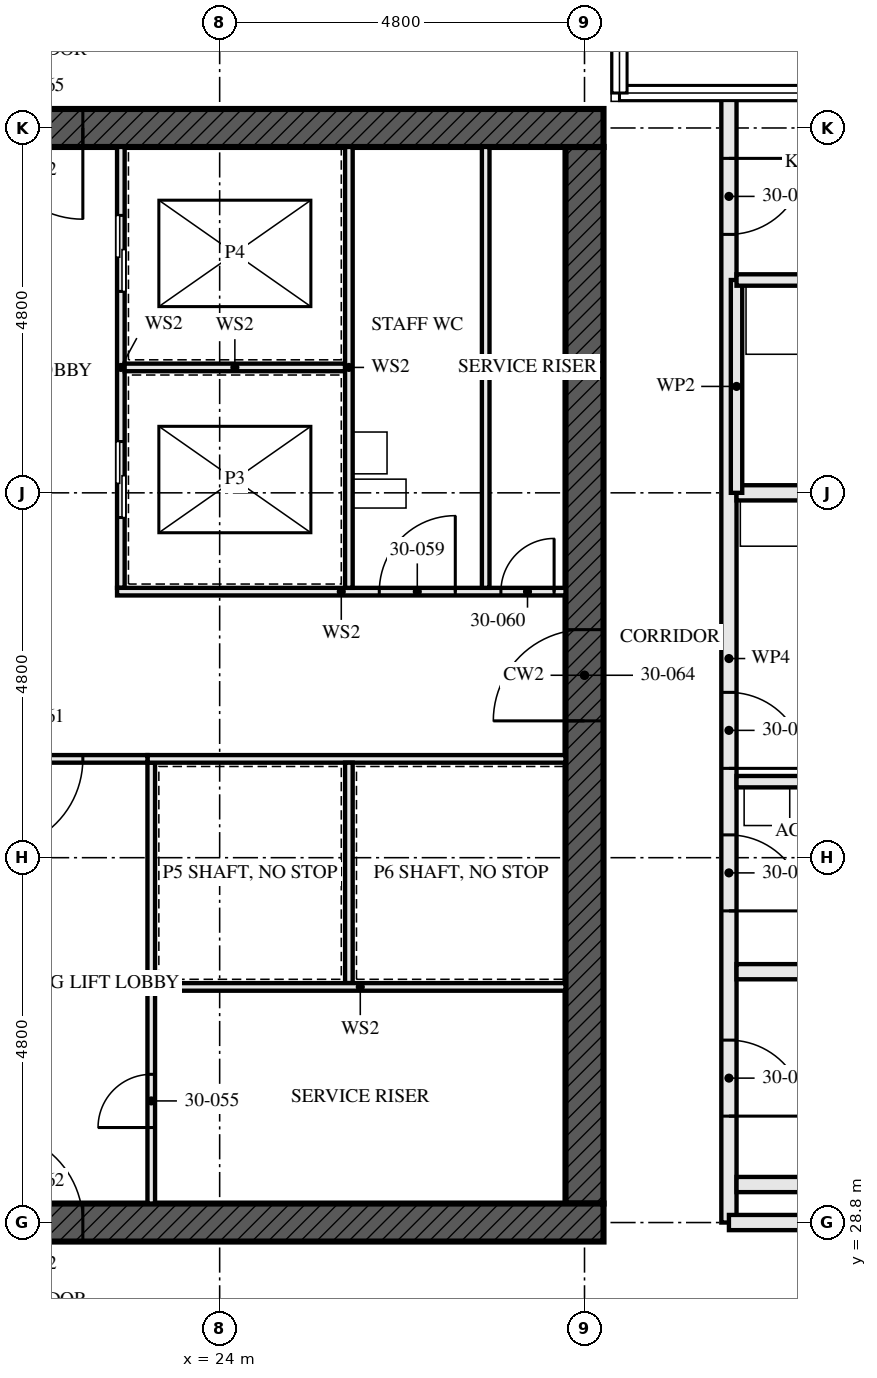
"""IFC4 building model, lengths in metres.
Left out: names, types, materials, properties, quantities, classifications, styles, units other than length and angle.
Written with IfcOpenShell. Run it as: python <this file> out.ifc"""

import sys

from ifc_helpers import new_model, si_unit, direction, frame, frame_2d, origin, place, context, subcontext, project, spatial, rectangle, extrude, element, fill, save


model = new_model("IFC4")
c1 = context("Model", 3, precision=1e-05, world=origin(), true_north=direction((0.0, 1.0)))
c2 = subcontext(c1, "Body", "Model", "MODEL_VIEW")
j1 = project(units=[si_unit("LENGTHUNIT", "METRE"), si_unit("PLANEANGLEUNIT", "RADIAN")], contexts=[c1])
p1 = place(None, origin())
s1 = spatial("IfcSite", under=j1, at=p1, CompositionType="ELEMENT")
p2 = place(p1, origin())
s2 = spatial("IfcBuilding", under=s1, at=p2, CompositionType="ELEMENT")
p3 = place(p2, frame((0.0, 0.0, 112.0)))
s3 = spatial("IfcBuildingStorey", under=s2, at=p3, CompositionType="ELEMENT", Elevation=112.0)
p4 = place(p3, frame((14.15, 28.8, -0.17), z_axis=(0.0, 0.0, 1.0), x_axis=(1.0, 0.0, 0.0)))
e1 = element("IfcWall", 1, at=p4, inside=s3, PredefinedType="SHEAR", context=c2, shape_type="SweptSolid", body=[
    extrude(rectangle(XDim=14.9, YDim=0.5, at=frame_2d((7.45, 0.0))), origin(), (0.0, 0.0, 1.0), 3.5),
])
p5 = place(p4, frame((6.85, 0.0, 0.17)))
e2 = element("IfcOpeningElement", 2, at=p5, cuts=e1, PredefinedType="OPENING", context=c2, shape_type="SweptSolid", body=[
    extrude(rectangle(XDim=1.2, YDim=2.1, at=frame_2d((0.6, 1.05))), frame((0.0, 0.26, 0.0), z_axis=(0.0, -1.0, 0.0), x_axis=(1.0, 0.0, 0.0)), (0.0, 0.0, 1.0), 0.521),
])
p6 = place(p3, frame((29.05, 43.2, -0.17), z_axis=(0.0, 0.0, 1.0), x_axis=(-1.0, 0.0, 0.0)))
e3 = element("IfcWall", 3, at=p6, inside=s3, PredefinedType="SHEAR", context=c2, shape_type="SweptSolid", body=[
    extrude(rectangle(XDim=14.9, YDim=0.5, at=frame_2d((7.45, 0.0))), origin(), (0.0, 0.0, 1.0), 3.5),
])
p7 = place(p6, frame((6.85, 0.0, 0.17)))
e4 = element("IfcOpeningElement", 4, at=p7, cuts=e3, PredefinedType="OPENING", context=c2, shape_type="SweptSolid", body=[
    extrude(rectangle(XDim=1.2, YDim=2.1, at=frame_2d((0.6, 1.05))), frame((0.0, 0.26, 0.0), z_axis=(0.0, -1.0, 0.0), x_axis=(1.0, 0.0, 0.0)), (0.0, 0.0, 1.0), 0.521),
])
p8 = place(p3, frame((28.8, 29.05, -0.17), z_axis=(0.0, 0.0, 1.0), x_axis=(0.0, 1.0, 0.0)))
e5 = element("IfcWall", 5, at=p8, inside=s3, PredefinedType="SHEAR", context=c2, shape_type="SweptSolid", body=[
    extrude(rectangle(XDim=13.9, YDim=0.5, at=frame_2d((6.95, 0.0))), origin(), (0.0, 0.0, 1.0), 3.5),
])
p9 = place(p8, frame((6.35, 0.0, 0.17)))
e6 = element("IfcOpeningElement", 6, at=p9, cuts=e5, PredefinedType="OPENING", context=c2, shape_type="SweptSolid", body=[
    extrude(rectangle(XDim=1.2, YDim=2.1, at=frame_2d((0.6, 1.05))), frame((0.0, 0.26, 0.0), z_axis=(0.0, -1.0, 0.0), x_axis=(1.0, 0.0, 0.0)), (0.0, 0.0, 1.0), 0.521),
])
for number, where, z_axis, x_axis in (
    (7, (35.5, 29.3, 0.0), (0.0, 0.0, 1.0), (-1.0, 0.0, 0.0)),
    (8, (35.5, 32.1, 0.0), (0.0, 0.0, 1.0), (-1.0, 0.0, 0.0)),
):
    element("IfcWall", number, at=place(p3, frame(where, z_axis=z_axis, x_axis=x_axis)), inside=s3, PredefinedType="SOLIDWALL", context=c2, shape_type="SweptSolid", body=[
        extrude(rectangle(XDim=4.7, YDim=0.2, at=frame_2d((2.35, 0.0))), origin(), (0.0, 0.0, 1.0), 2.99),
    ])
p10 = place(p3, frame((33.8, 34.6, 0.0), z_axis=(0.0, 0.0, 1.0), x_axis=(-1.0, 0.0, 0.0)))
e9 = element("IfcWall", 9, at=p10, inside=s3, PredefinedType="PARTITIONING", context=c2, shape_type="SweptSolid", body=[
    extrude(rectangle(XDim=3.0, YDim=0.15, at=frame_2d((1.5, 0.0))), origin(), (0.0, 0.0, 1.0), 3.33),
])
p11 = place(p3, frame((38.08, 38.4, 0.0), z_axis=(0.0, 0.0, 1.0), x_axis=(-1.0, 0.0, 0.0)))
e10 = element("IfcWall", 10, at=p11, inside=s3, PredefinedType="PARTITIONING", context=c2, shape_type="SweptSolid", body=[
    extrude(rectangle(XDim=7.28, YDim=0.2, at=frame_2d((3.64, 0.0))), origin(), (0.0, 0.0, 1.0), 2.55),
])
p12 = place(p3, frame((33.8, 41.2, 0.0), z_axis=(0.0, 0.0, 1.0), x_axis=(-1.0, 0.0, 0.0)))
e11 = element("IfcWall", 11, at=p12, inside=s3, PredefinedType="PARTITIONING", context=c2, shape_type="SweptSolid", body=[
    extrude(rectangle(XDim=3.0, YDim=0.15, at=frame_2d((1.5, 0.0))), origin(), (0.0, 0.0, 1.0), 3.33),
])
p13 = place(p3, frame((30.8, 38.4, 0.0), z_axis=(0.0, 0.0, 1.0), x_axis=(0.0, 1.0, 0.0)))
e12 = element("IfcWall", 12, at=p13, inside=s3, PredefinedType="PARTITIONING", context=c2, shape_type="SweptSolid", body=[
    extrude(rectangle(XDim=2.8, YDim=0.15, at=frame_2d((1.4, 0.0))), origin(), (0.0, 0.0, 1.0), 3.33),
])
p14 = place(p3, frame((30.7, 28.8, 0.0), z_axis=(0.0, 0.0, 1.0), x_axis=(0.0, 1.0, 0.0)))
e13 = element("IfcWall", 13, at=p14, inside=s3, PredefinedType="PARTITIONING", context=c2, shape_type="SweptSolid", body=[
    extrude(rectangle(XDim=14.84, YDim=0.2, at=frame_2d((7.42, 0.0))), origin(), (0.0, 0.0, 1.0), 2.32),
])
p15 = place(p14, frame((1.4, 0.0, 0.0)))
e14 = element("IfcOpeningElement", 14, at=p15, cuts=e13, PredefinedType="OPENING", context=c2, shape_type="SweptSolid", body=[
    extrude(rectangle(XDim=1.0, YDim=2.1, at=frame_2d((0.5, 1.05))), frame((0.0, 0.111, 0.0), z_axis=(0.0, -1.0, 0.0), x_axis=(1.0, 0.0, 0.0)), (0.0, 0.0, 1.0), 0.221),
])
p16 = place(p14, frame((4.1, 0.0, 0.0)))
e15 = element("IfcOpeningElement", 15, at=p16, cuts=e13, PredefinedType="OPENING", context=c2, shape_type="SweptSolid", body=[
    extrude(rectangle(XDim=1.0, YDim=2.1, at=frame_2d((0.5, 1.05))), frame((0.0, 0.111, 0.0), z_axis=(0.0, -1.0, 0.0), x_axis=(1.0, 0.0, 0.0)), (0.0, 0.0, 1.0), 0.221),
])
p17 = place(p14, frame((5.975, 0.0, 0.0)))
e16 = element("IfcOpeningElement", 16, at=p17, cuts=e13, PredefinedType="OPENING", context=c2, shape_type="SweptSolid", body=[
    extrude(rectangle(XDim=1.0, YDim=2.1, at=frame_2d((0.5, 1.05))), frame((0.0, 0.111, 0.0), z_axis=(0.0, -1.0, 0.0), x_axis=(1.0, 0.0, 0.0)), (0.0, 0.0, 1.0), 0.221),
])
p18 = place(p14, frame((13.0, 0.0, 0.0)))
e17 = element("IfcOpeningElement", 17, at=p18, cuts=e13, PredefinedType="OPENING", context=c2, shape_type="SweptSolid", body=[
    extrude(rectangle(XDim=1.0, YDim=2.1, at=frame_2d((0.5, 1.05))), frame((0.0, 0.111, 0.0), z_axis=(0.0, -1.0, 0.0), x_axis=(1.0, 0.0, 0.0)), (0.0, 0.0, 1.0), 0.221),
])
p19 = place(p3, frame((27.5, 37.15, 0.0), z_axis=(0.0, 0.0, 1.0), x_axis=(0.0, 1.0, 0.0)))
e18 = element("IfcWall", 18, at=p19, inside=s3, PredefinedType="SOLIDWALL", context=c2, shape_type="SweptSolid", body=[
    extrude(rectangle(XDim=5.8, YDim=0.1, at=frame_2d((2.9, 0.0))), origin(), (0.0, 0.0, 1.0), 3.33),
])
p20 = place(p3, frame((22.7, 37.15, 0.0), z_axis=(0.0, 0.0, 1.0), x_axis=(0.0, 1.0, 0.0)))
e19 = element("IfcWall", 19, at=p20, inside=s3, PredefinedType="SOLIDWALL", context=c2, shape_type="SweptSolid", body=[
    extrude(rectangle(XDim=5.8, YDim=0.1, at=frame_2d((2.9, 0.0))), origin(), (0.0, 0.0, 1.0), 3.33),
])
p21 = place(p20, frame((0.925, 0.0, 0.0)))
e20 = element("IfcOpeningElement", 20, at=p21, cuts=e19, PredefinedType="OPENING", context=c2, shape_type="SweptSolid", body=[
    extrude(rectangle(XDim=1.0, YDim=2.1, at=frame_2d((0.5, 1.05))), frame((0.0, 0.061, 0.0), z_axis=(0.0, -1.0, 0.0), x_axis=(1.0, 0.0, 0.0)), (0.0, 0.0, 1.0), 0.121),
])
p22 = place(p20, frame((3.9, 0.0, 0.0)))
e21 = element("IfcOpeningElement", 21, at=p22, cuts=e19, PredefinedType="OPENING", context=c2, shape_type="SweptSolid", body=[
    extrude(rectangle(XDim=1.0, YDim=2.1, at=frame_2d((0.5, 1.05))), frame((0.0, 0.061, 0.0), z_axis=(0.0, -1.0, 0.0), x_axis=(1.0, 0.0, 0.0)), (0.0, 0.0, 1.0), 0.121),
])
p23 = place(p3, frame((23.1, 29.05, 0.0), z_axis=(0.0, 0.0, 1.0), x_axis=(0.0, 1.0, 0.0)))
e22 = element("IfcWall", 22, at=p23, inside=s3, PredefinedType="SOLIDWALL", context=c2, shape_type="SweptSolid", body=[
    extrude(rectangle(XDim=5.8, YDim=0.1, at=frame_2d((2.9, 0.0))), origin(), (0.0, 0.0, 1.0), 3.33),
])
p24 = place(p23, frame((1.0, 0.0, 0.0)))
e23 = element("IfcOpeningElement", 23, at=p24, cuts=e22, PredefinedType="OPENING", context=c2, shape_type="SweptSolid", body=[
    extrude(rectangle(XDim=0.7, YDim=2.1, at=frame_2d((0.35, 1.05))), frame((0.0, 0.061, 0.0), z_axis=(0.0, -1.0, 0.0), x_axis=(1.0, 0.0, 0.0)), (0.0, 0.0, 1.0), 0.121),
])
p25 = place(p3, frame((23.05, 34.9, 0.0), z_axis=(0.0, 0.0, 1.0), x_axis=(1.0, 0.0, 0.0)))
e24 = element("IfcWall", 24, at=p25, inside=s3, PredefinedType="SOLIDWALL", context=c2, shape_type="SweptSolid", body=[
    extrude(rectangle(XDim=5.5, YDim=0.1, at=frame_2d((2.75, 0.0))), origin(), (0.0, 0.0, 1.0), 3.33),
])
p26 = place(p3, frame((22.65, 37.1, 0.0), z_axis=(0.0, 0.0, 1.0), x_axis=(1.0, 0.0, 0.0)))
e25 = element("IfcWall", 25, at=p26, inside=s3, PredefinedType="SOLIDWALL", context=c2, shape_type="SweptSolid", body=[
    extrude(rectangle(XDim=5.9, YDim=0.1, at=frame_2d((2.95, 0.0))), origin(), (0.0, 0.0, 1.0), 3.33),
])
p27 = place(p26, frame((3.45, 0.0, 0.0)))
e26 = element("IfcOpeningElement", 26, at=p27, cuts=e25, PredefinedType="OPENING", context=c2, shape_type="SweptSolid", body=[
    extrude(rectangle(XDim=1.0, YDim=2.1, at=frame_2d((0.5, 1.05))), frame((0.0, 0.061, 0.0), z_axis=(0.0, -1.0, 0.0), x_axis=(1.0, 0.0, 0.0)), (0.0, 0.0, 1.0), 0.121),
])
p28 = place(p26, frame((5.05, 0.0, 0.0)))
e27 = element("IfcOpeningElement", 27, at=p28, cuts=e25, PredefinedType="OPENING", context=c2, shape_type="SweptSolid", body=[
    extrude(rectangle(XDim=0.7, YDim=2.1, at=frame_2d((0.35, 1.05))), frame((0.0, 0.061, 0.0), z_axis=(0.0, -1.0, 0.0), x_axis=(1.0, 0.0, 0.0)), (0.0, 0.0, 1.0), 0.121),
])
p29 = place(p3, frame((20.55, 34.9, 0.0), z_axis=(0.0, 0.0, 1.0), x_axis=(1.0, 0.0, 0.0)))
e28 = element("IfcWall", 28, at=p29, inside=s3, PredefinedType="SOLIDWALL", context=c2, shape_type="SweptSolid", body=[
    extrude(rectangle(XDim=2.5, YDim=0.1, at=frame_2d((1.25, 0.0))), origin(), (0.0, 0.0, 1.0), 3.33),
])
p30 = place(p29, frame((0.45, 0.0, 0.0)))
e29 = element("IfcOpeningElement", 29, at=p30, cuts=e28, PredefinedType="OPENING", context=c2, shape_type="SweptSolid", body=[
    extrude(rectangle(XDim=1.2, YDim=2.1, at=frame_2d((0.6, 1.05))), frame((0.0, 0.061, 0.0), z_axis=(0.0, -1.0, 0.0), x_axis=(1.0, 0.0, 0.0)), (0.0, 0.0, 1.0), 0.121),
])
p31 = place(p3, frame((22.75, 40.05, 0.0), z_axis=(0.0, 0.0, 1.0), x_axis=(1.0, 0.0, 0.0)))
e30 = element("IfcWall", 30, at=p31, inside=s3, PredefinedType="SOLIDWALL", context=c2, shape_type="SweptSolid", body=[
    extrude(rectangle(XDim=2.9, YDim=0.1, at=frame_2d((1.45, 0.0))), origin(), (0.0, 0.0, 1.0), 3.33),
])
p32 = place(p3, frame((25.7, 37.15, 0.0), z_axis=(0.0, 0.0, 1.0), x_axis=(0.0, 1.0, 0.0)))
e31 = element("IfcWall", 31, at=p32, inside=s3, PredefinedType="SOLIDWALL", context=c2, shape_type="SweptSolid", body=[
    extrude(rectangle(XDim=5.8, YDim=0.1, at=frame_2d((2.9, 0.0))), origin(), (0.0, 0.0, 1.0), 3.33),
])
p33 = place(p3, frame((25.7, 31.95, 0.0), z_axis=(0.0, 0.0, 1.0), x_axis=(0.0, 1.0, 0.0)))
e32 = element("IfcWall", 32, at=p33, inside=s3, PredefinedType="SOLIDWALL", context=c2, shape_type="SweptSolid", body=[
    extrude(rectangle(XDim=2.9, YDim=0.1, at=frame_2d((1.45, 0.0))), origin(), (0.0, 0.0, 1.0), 3.33),
])
p34 = place(p3, frame((23.15, 31.9, 0.0), z_axis=(0.0, 0.0, 1.0), x_axis=(1.0, 0.0, 0.0)))
e33 = element("IfcWall", 33, at=p34, inside=s3, PredefinedType="SOLIDWALL", context=c2, shape_type="SweptSolid", body=[
    extrude(rectangle(XDim=5.4, YDim=0.1, at=frame_2d((2.7, 0.0))), origin(), (0.0, 0.0, 1.0), 3.33),
])
p35 = place(p3, frame((33.255, 28.8, 0.0), z_axis=(0.0, 0.0, 1.0), x_axis=(-1.0, 0.0, 0.0)))
e34 = element("IfcWall", 34, at=p35, inside=s3, PredefinedType="PARTITIONING", context=c2, shape_type="SweptSolid", body=[
    extrude(rectangle(XDim=2.555, YDim=0.2, at=frame_2d((1.277, 0.0))), origin(), (0.0, 0.0, 1.0), 2.32),
])
p36 = place(p15, frame((1.0, 0.0, 0.0), z_axis=(0.0, 0.0, 1.0), x_axis=(-1.0, 0.0, 0.0)))
e35 = element("IfcDoor", 35, at=p36, inside=s3, OperationType="SINGLE_SWING_LEFT", PredefinedType="DOOR", context=c2, shape_type="SweptSolid", body=[
    extrude(rectangle(XDim=1.0, YDim=2.1, at=frame_2d((0.5, 1.05))), frame((0.0, 0.032, 0.0), z_axis=(0.0, -1.0, 0.0), x_axis=(1.0, 0.0, 0.0)), (0.0, 0.0, 1.0), 0.064),
])
fill(e14, e35)
p37 = place(p16, frame((1.0, 0.0, 0.0), z_axis=(0.0, 0.0, 1.0), x_axis=(-1.0, 0.0, 0.0)))
e36 = element("IfcDoor", 36, at=p37, inside=s3, OperationType="SINGLE_SWING_LEFT", PredefinedType="DOOR", context=c2, shape_type="SweptSolid", body=[
    extrude(rectangle(XDim=1.0, YDim=2.1, at=frame_2d((0.5, 1.05))), frame((0.0, 0.027, 0.0), z_axis=(0.0, -1.0, 0.0), x_axis=(1.0, 0.0, 0.0)), (0.0, 0.0, 1.0), 0.054),
])
fill(e15, e36)
p38 = place(p17, frame((1.0, 0.0, 0.0), z_axis=(0.0, 0.0, 1.0), x_axis=(-1.0, 0.0, 0.0)))
e37 = element("IfcDoor", 37, at=p38, inside=s3, OperationType="SINGLE_SWING_LEFT", PredefinedType="DOOR", context=c2, shape_type="SweptSolid", body=[
    extrude(rectangle(XDim=1.0, YDim=2.1, at=frame_2d((0.5, 1.05))), frame((0.0, 0.027, 0.0), z_axis=(0.0, -1.0, 0.0), x_axis=(1.0, 0.0, 0.0)), (0.0, 0.0, 1.0), 0.054),
])
fill(e16, e37)
p39 = place(p18, frame((1.0, 0.0, 0.0), z_axis=(0.0, 0.0, 1.0), x_axis=(-1.0, 0.0, 0.0)))
e38 = element("IfcDoor", 38, at=p39, inside=s3, OperationType="SINGLE_SWING_RIGHT", PredefinedType="DOOR", context=c2, shape_type="SweptSolid", body=[
    extrude(rectangle(XDim=1.0, YDim=2.1, at=frame_2d((0.5, 1.05))), frame((0.0, 0.027, 0.0), z_axis=(0.0, -1.0, 0.0), x_axis=(1.0, 0.0, 0.0)), (0.0, 0.0, 1.0), 0.054),
])
fill(e17, e38)
p40 = place(p21, origin())
e39 = element("IfcDoor", 39, at=p40, inside=s3, OperationType="SLIDING_TO_LEFT", PredefinedType="DOOR", context=c2, shape_type="SweptSolid", body=[
    extrude(rectangle(XDim=1.0, YDim=2.1, at=frame_2d((0.5, 1.05))), frame((0.0, 0.05, 0.0), z_axis=(0.0, -1.0, 0.0), x_axis=(1.0, 0.0, 0.0)), (0.0, 0.0, 1.0), 0.1),
])
fill(e20, e39)
p41 = place(p22, origin())
e40 = element("IfcDoor", 40, at=p41, inside=s3, OperationType="SLIDING_TO_LEFT", PredefinedType="DOOR", context=c2, shape_type="SweptSolid", body=[
    extrude(rectangle(XDim=1.0, YDim=2.1, at=frame_2d((0.5, 1.05))), frame((0.0, 0.05, 0.0), z_axis=(0.0, -1.0, 0.0), x_axis=(1.0, 0.0, 0.0)), (0.0, 0.0, 1.0), 0.1),
])
fill(e21, e40)
p42 = place(p24, origin())
e41 = element("IfcDoor", 41, at=p42, inside=s3, OperationType="SINGLE_SWING_RIGHT", PredefinedType="DOOR", context=c2, shape_type="SweptSolid", body=[
    extrude(rectangle(XDim=0.7, YDim=2.1, at=frame_2d((0.35, 1.05))), frame((0.0, 0.027, 0.0), z_axis=(0.0, -1.0, 0.0), x_axis=(1.0, 0.0, 0.0)), (0.0, 0.0, 1.0), 0.054),
])
fill(e23, e41)
p43 = place(p27, origin())
e42 = element("IfcDoor", 42, at=p43, inside=s3, OperationType="SINGLE_SWING_LEFT", PredefinedType="DOOR", context=c2, shape_type="SweptSolid", body=[
    extrude(rectangle(XDim=1.0, YDim=2.1, at=frame_2d((0.5, 1.05))), frame((0.0, 0.027, 0.0), z_axis=(0.0, -1.0, 0.0), x_axis=(1.0, 0.0, 0.0)), (0.0, 0.0, 1.0), 0.054),
])
fill(e26, e42)
p44 = place(p28, origin())
e43 = element("IfcDoor", 43, at=p44, inside=s3, OperationType="SINGLE_SWING_LEFT", PredefinedType="DOOR", context=c2, shape_type="SweptSolid", body=[
    extrude(rectangle(XDim=0.7, YDim=2.1, at=frame_2d((0.35, 1.05))), frame((0.0, 0.027, 0.0), z_axis=(0.0, -1.0, 0.0), x_axis=(1.0, 0.0, 0.0)), (0.0, 0.0, 1.0), 0.054),
])
fill(e27, e43)
p45 = place(p30, frame((1.2, 0.0, 0.0), z_axis=(0.0, 0.0, 1.0), x_axis=(-1.0, 0.0, 0.0)))
e44 = element("IfcDoor", 44, at=p45, inside=s3, OperationType="SINGLE_SWING_LEFT", PredefinedType="DOOR", context=c2, shape_type="SweptSolid", body=[
    extrude(rectangle(XDim=1.2, YDim=2.1, at=frame_2d((0.6, 1.05))), frame((0.0, 0.027, 0.0), z_axis=(0.0, -1.0, 0.0), x_axis=(1.0, 0.0, 0.0)), (0.0, 0.0, 1.0), 0.054),
])
fill(e29, e44)
p46 = place(p5, origin())
e45 = element("IfcDoor", 45, at=p46, inside=s3, OperationType="SINGLE_SWING_LEFT", PredefinedType="DOOR", context=c2, shape_type="SweptSolid", body=[
    extrude(rectangle(XDim=1.2, YDim=2.1, at=frame_2d((0.6, 1.05))), frame((0.0, 0.027, 0.0), z_axis=(0.0, -1.0, 0.0), x_axis=(1.0, 0.0, 0.0)), (0.0, 0.0, 1.0), 0.054),
])
fill(e2, e45)
p47 = place(p9, origin())
e46 = element("IfcDoor", 46, at=p47, inside=s3, OperationType="SINGLE_SWING_LEFT", PredefinedType="DOOR", context=c2, shape_type="SweptSolid", body=[
    extrude(rectangle(XDim=1.2, YDim=2.1, at=frame_2d((0.6, 1.05))), frame((0.0, 0.027, 0.0), z_axis=(0.0, -1.0, 0.0), x_axis=(1.0, 0.0, 0.0)), (0.0, 0.0, 1.0), 0.054),
])
fill(e6, e46)
p48 = place(p7, origin())
e47 = element("IfcDoor", 47, at=p48, inside=s3, OperationType="SINGLE_SWING_LEFT", PredefinedType="DOOR", context=c2, shape_type="SweptSolid", body=[
    extrude(rectangle(XDim=1.2, YDim=2.1, at=frame_2d((0.6, 1.05))), frame((0.0, 0.027, 0.0), z_axis=(0.0, -1.0, 0.0), x_axis=(1.0, 0.0, 0.0)), (0.0, 0.0, 1.0), 0.054),
])
fill(e4, e47)
save(model, sys.argv[1])
